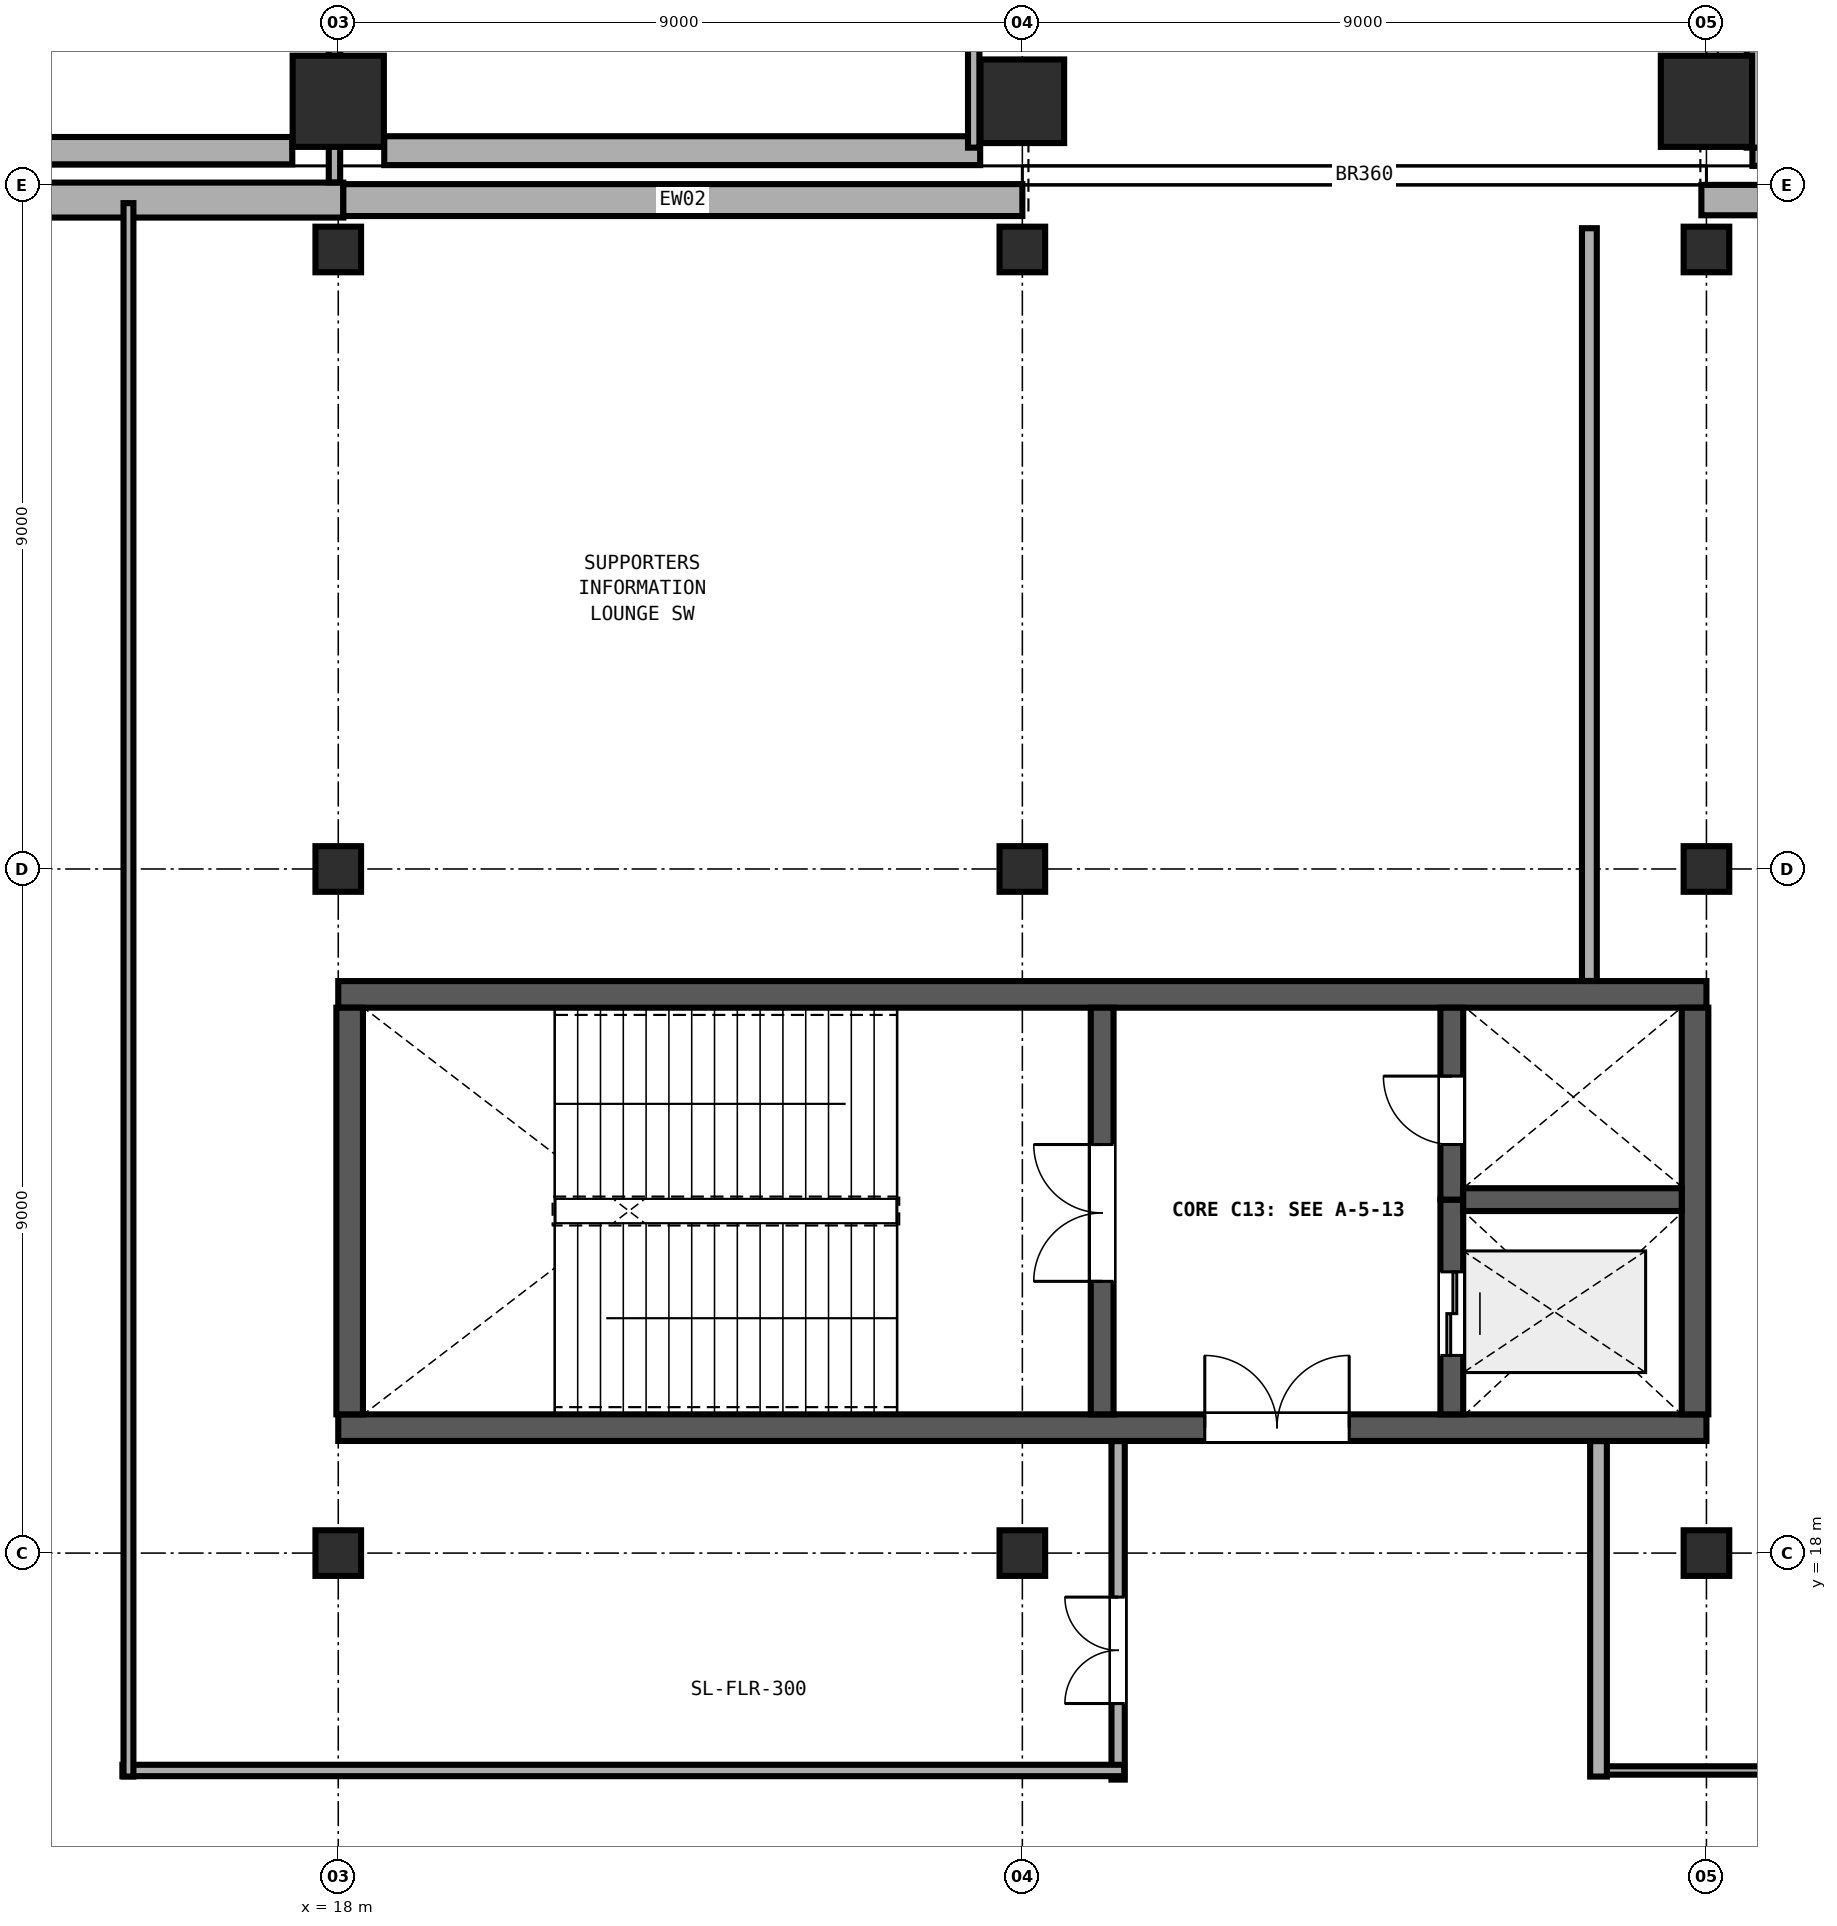
"""IFC4 building model, lengths in metres.
Left out: names, types, materials, properties, quantities, classifications, styles, units other than length and angle.
Written with IfcOpenShell. Run it as: python <this file> out.ifc"""

import sys

from ifc_helpers import new_model, si_unit, direction, frame, frame_2d, origin, origin_2d, place, context, subcontext, project, spatial, rectangle, extrude, element, fill, save


model = new_model("IFC4")
c1 = context("Model", 3, precision=1e-05, world=origin(), true_north=direction((0.0, 1.0)))
c2 = subcontext(c1, "Body", "Model", "MODEL_VIEW")
j1 = project(units=[si_unit("LENGTHUNIT", "METRE"), si_unit("PLANEANGLEUNIT", "RADIAN")], contexts=[c1])
p1 = place(None, origin())
s1 = spatial("IfcSite", under=j1, at=p1, CompositionType="ELEMENT")
p2 = place(p1, origin())
s2 = spatial("IfcBuilding", under=s1, at=p2, CompositionType="ELEMENT")
p3 = place(p2, frame((0.0, 0.0, 4.8)))
s3 = spatial("IfcBuildingStorey", under=s2, at=p3, CompositionType="ELEMENT", Elevation=4.8)
p4 = place(p3, frame((18.0, 37.1, 0.0), z_axis=(0.0, 0.0, 1.0), x_axis=(1.0, 0.0, 0.0)))
e1 = element("IfcColumn", 1, at=p4, inside=s3, PredefinedType="COLUMN", context=c2, shape_type="SweptSolid", body=[
    extrude(rectangle(XDim=1.2, YDim=1.2, at=origin_2d()), origin(), (0.0, 0.0, 1.0), 4.8),
])
p5 = place(p3, frame((27.0, 37.1, 0.0), z_axis=(0.0, 0.0, 1.0), x_axis=(1.0, 0.0, 0.0)))
e2 = element("IfcColumn", 2, at=p5, inside=s3, PredefinedType="COLUMN", context=c2, shape_type="SweptSolid", body=[
    extrude(rectangle(XDim=1.1, YDim=1.1, at=origin_2d()), origin(), (0.0, 0.0, 1.0), 4.8),
])
p6 = place(p3, frame((36.0, 37.1, 0.0), z_axis=(0.0, 0.0, 1.0), x_axis=(1.0, 0.0, 0.0)))
e3 = element("IfcColumn", 3, at=p6, inside=s3, PredefinedType="COLUMN", context=c2, shape_type="SweptSolid", body=[
    extrude(rectangle(XDim=1.2, YDim=1.2, at=origin_2d()), origin(), (0.0, 0.0, 1.0), 4.8),
])
for number, where, z_axis, x_axis in (
    (4, (18.0, 18.0, 0.0), (0.0, 0.0, 1.0), (1.0, 0.0, 0.0)),
    (5, (18.0, 27.0, 0.0), (0.0, 0.0, 1.0), (1.0, 0.0, 0.0)),
    (6, (18.0, 35.15, 0.0), (0.0, 0.0, 1.0), (1.0, 0.0, 0.0)),
    (7, (27.0, 18.0, 0.0), (0.0, 0.0, 1.0), (1.0, 0.0, 0.0)),
    (8, (27.0, 27.0, 0.0), (0.0, 0.0, 1.0), (1.0, 0.0, 0.0)),
    (9, (27.0, 35.15, 0.0), (0.0, 0.0, 1.0), (1.0, 0.0, 0.0)),
    (10, (36.0, 18.0, 0.0), (0.0, 0.0, 1.0), (1.0, 0.0, 0.0)),
    (11, (36.0, 27.0, 0.0), (0.0, 0.0, 1.0), (1.0, 0.0, 0.0)),
    (12, (36.0, 35.15, 0.0), (0.0, 0.0, 1.0), (1.0, 0.0, 0.0)),
):
    element("IfcColumn", number, at=place(p3, frame(where, z_axis=z_axis, x_axis=x_axis)), inside=s3, PredefinedType="COLUMN", context=c2, shape_type="SweptSolid", body=[
        extrude(rectangle(XDim=0.6, YDim=0.6, at=origin_2d()), origin(), (0.0, 0.0, 1.0), 4.8),
    ])
p7 = place(p3, frame((18.0, 19.65, 0.0), z_axis=(0.0, 0.0, 1.0), x_axis=(1.0, 0.0, 0.0)))
e13 = element("IfcWall", 13, at=p7, inside=s3, PredefinedType="SHEAR", context=c2, shape_type="SweptSolid", body=[
    extrude(rectangle(XDim=18.0, YDim=0.35, at=frame_2d((9.0, 0.0))), origin(), (0.0, 0.0, 1.0), 4.565),
])
p8 = place(p7, frame((11.4, 0.0, 0.0)))
e14 = element("IfcOpeningElement", 14, at=p8, cuts=e13, PredefinedType="OPENING", context=c2, shape_type="SweptSolid", body=[
    extrude(rectangle(XDim=1.9, YDim=2.25, at=frame_2d((0.95, 1.125))), frame((0.0, 0.185, 0.0), z_axis=(0.0, -1.0, 0.0), x_axis=(1.0, 0.0, 0.0)), (0.0, 0.0, 1.0), 0.37),
])
p9 = place(p3, frame((36.0, 25.35, 0.0), z_axis=(0.0, 0.0, 1.0), x_axis=(-1.0, 0.0, 0.0)))
e15 = element("IfcWall", 15, at=p9, inside=s3, PredefinedType="SHEAR", context=c2, shape_type="SweptSolid", body=[
    extrude(rectangle(XDim=18.0, YDim=0.35, at=frame_2d((9.0, 0.0))), origin(), (0.0, 0.0, 1.0), 4.565),
])
for number, where, z_axis, x_axis in (
    (16, (18.15, 25.175, 0.0), (0.0, 0.0, 1.0), (0.0, -1.0, 0.0)),
    (17, (35.85, 19.825, 0.0), (0.0, 0.0, 1.0), (0.0, 1.0, 0.0)),
):
    element("IfcWall", number, at=place(p3, frame(where, z_axis=z_axis, x_axis=x_axis)), inside=s3, PredefinedType="SHEAR", context=c2, shape_type="SweptSolid", body=[
        extrude(rectangle(XDim=5.35, YDim=0.35, at=frame_2d((2.675, 0.0))), origin(), (0.0, 0.0, 1.0), 4.565),
    ])
p10 = place(p3, frame((28.05, 19.825, 0.0), z_axis=(0.0, 0.0, 1.0), x_axis=(0.0, 1.0, 0.0)))
e18 = element("IfcWall", 18, at=p10, inside=s3, PredefinedType="SHEAR", context=c2, shape_type="SweptSolid", body=[
    extrude(rectangle(XDim=5.35, YDim=0.3, at=frame_2d((2.675, 0.0))), origin(), (0.0, 0.0, 1.0), 4.565),
])
p11 = place(p10, frame((1.75, 0.0, 0.0)))
e19 = element("IfcOpeningElement", 19, at=p11, cuts=e18, PredefinedType="OPENING", context=c2, shape_type="SweptSolid", body=[
    extrude(rectangle(XDim=1.8, YDim=2.25, at=frame_2d((0.9, 1.125))), frame((0.0, 0.16, 0.0), z_axis=(0.0, -1.0, 0.0), x_axis=(1.0, 0.0, 0.0)), (0.0, 0.0, 1.0), 0.32),
])
p12 = place(p3, frame((32.65, 19.825, 0.0), z_axis=(0.0, 0.0, 1.0), x_axis=(0.0, 1.0, 0.0)))
e20 = element("IfcWall", 20, at=p12, inside=s3, PredefinedType="SHEAR", context=c2, shape_type="SweptSolid", body=[
    extrude(rectangle(XDim=2.825, YDim=0.3, at=frame_2d((1.413, 0.0))), origin(), (0.0, 0.0, 1.0), 4.565),
])
p13 = place(p12, frame((0.775, 0.0, 0.0)))
e21 = element("IfcOpeningElement", 21, at=p13, cuts=e20, PredefinedType="OPENING", context=c2, shape_type="SweptSolid", body=[
    extrude(rectangle(XDim=1.1, YDim=2.1, at=frame_2d((0.55, 1.05))), frame((0.0, 0.16, 0.0), z_axis=(0.0, -1.0, 0.0), x_axis=(1.0, 0.0, 0.0)), (0.0, 0.0, 1.0), 0.32),
])
p14 = place(p3, frame((32.65, 22.65, 0.0), z_axis=(0.0, 0.0, 1.0), x_axis=(0.0, 1.0, 0.0)))
e22 = element("IfcWall", 22, at=p14, inside=s3, PredefinedType="SHEAR", context=c2, shape_type="SweptSolid", body=[
    extrude(rectangle(XDim=2.525, YDim=0.3, at=frame_2d((1.263, 0.0))), origin(), (0.0, 0.0, 1.0), 4.565),
])
p15 = place(p14, frame((0.725, 0.0, 0.0)))
e23 = element("IfcOpeningElement", 23, at=p15, cuts=e22, PredefinedType="OPENING", context=c2, shape_type="SweptSolid", body=[
    extrude(rectangle(XDim=0.9, YDim=2.1, at=frame_2d((0.45, 1.05))), frame((0.0, 0.16, 0.0), z_axis=(0.0, -1.0, 0.0), x_axis=(1.0, 0.0, 0.0)), (0.0, 0.0, 1.0), 0.32),
])
p16 = place(p3, frame((32.8, 22.65, 0.0), z_axis=(0.0, 0.0, 1.0), x_axis=(1.0, 0.0, 0.0)))
e24 = element("IfcWall", 24, at=p16, inside=s3, PredefinedType="SHEAR", context=c2, shape_type="SweptSolid", body=[
    extrude(rectangle(XDim=2.875, YDim=0.3, at=frame_2d((1.438, 0.0))), origin(), (0.0, 0.0, 1.0), 4.565),
])
p17 = place(p3, frame((43.745, 36.45, 0.0), z_axis=(0.0, 0.0, 1.0), x_axis=(-1.0, 0.0, 0.0)))
e25 = element("IfcWall", 25, at=p17, inside=s3, PredefinedType="SOLIDWALL", context=c2, shape_type="SweptSolid", body=[
    extrude(rectangle(XDim=7.14, YDim=0.4, at=frame_2d((3.57, 0.0))), origin(), (0.0, 0.0, 1.0), 3.28),
])
p18 = place(p3, frame((26.445, 36.45, 0.0), z_axis=(0.0, 0.0, 1.0), x_axis=(-1.0, 0.0, 0.0)))
e26 = element("IfcWall", 26, at=p18, inside=s3, PredefinedType="SOLIDWALL", context=c2, shape_type="SweptSolid", body=[
    extrude(rectangle(XDim=7.84, YDim=0.38, at=frame_2d((3.92, 0.0))), origin(), (0.0, 0.0, 1.0), 3.28),
])
p19 = place(p3, frame((17.395, 36.45, 0.0), z_axis=(0.0, 0.0, 1.0), x_axis=(-1.0, 0.0, 0.0)))
e27 = element("IfcWall", 27, at=p19, inside=s3, PredefinedType="SOLIDWALL", context=c2, shape_type="SweptSolid", body=[
    extrude(rectangle(XDim=7.84, YDim=0.36, at=frame_2d((3.92, 0.0))), origin(), (0.0, 0.0, 1.0), 3.28),
])
p20 = place(p3, frame((9.133, 35.8, 0.0), z_axis=(0.0, 0.0, 1.0), x_axis=(1.0, 0.0, 0.0)))
e28 = element("IfcWall", 28, at=p20, inside=s3, PredefinedType="SOLIDWALL", context=c2, shape_type="SweptSolid", body=[
    extrude(rectangle(XDim=8.933, YDim=0.46, at=frame_2d((4.467, 0.0))), origin(), (0.0, 0.0, 1.0), 3.28),
])
p21 = place(p3, frame((18.067, 35.8, 0.0), z_axis=(0.0, 0.0, 1.0), x_axis=(1.0, 0.0, 0.0)))
e29 = element("IfcWall", 29, at=p21, inside=s3, PredefinedType="SOLIDWALL", context=c2, shape_type="SweptSolid", body=[
    extrude(rectangle(XDim=8.933, YDim=0.42, at=frame_2d((4.467, 0.0))), origin(), (0.0, 0.0, 1.0), 3.28),
])
p22 = place(p3, frame((35.933, 35.8, 0.0), z_axis=(0.0, 0.0, 1.0), x_axis=(1.0, 0.0, 0.0)))
e30 = element("IfcWall", 30, at=p22, inside=s3, PredefinedType="SOLIDWALL", context=c2, shape_type="SweptSolid", body=[
    extrude(rectangle(XDim=8.933, YDim=0.4, at=frame_2d((4.467, 0.0))), origin(), (0.0, 0.0, 1.0), 3.28),
])
p23 = place(p3, frame((17.95, 53.173, 0.0), z_axis=(0.0, 0.0, 1.0), x_axis=(0.0, -1.0, 0.0)))
e31 = element("IfcWall", 31, at=p23, inside=s3, PredefinedType="PARTITIONING", context=c2, shape_type="SweptSolid", body=[
    extrude(rectangle(XDim=17.14, YDim=0.15, at=frame_2d((8.57, 0.0))), origin(), (0.0, 0.0, 1.0), 3.28),
])
p24 = place(p3, frame((26.36, 39.5, 0.0), z_axis=(0.0, 0.0, 1.0), x_axis=(0.0, -1.0, 0.0)))
e32 = element("IfcWall", 32, at=p24, inside=s3, PredefinedType="PARTITIONING", context=c2, shape_type="SweptSolid", body=[
    extrude(rectangle(XDim=3.01, YDim=0.15, at=frame_2d((1.505, 0.0))), origin(), (0.0, 0.0, 1.0), 3.28),
])
p25 = place(p3, frame((36.64, 36.49, 0.0), z_axis=(0.0, 0.0, 1.0), x_axis=(0.0, 1.0, 0.0)))
e33 = element("IfcWall", 33, at=p25, inside=s3, PredefinedType="PARTITIONING", context=c2, shape_type="SweptSolid", body=[
    extrude(rectangle(XDim=3.01, YDim=0.22, at=frame_2d((1.505, 0.0))), origin(), (0.0, 0.0, 1.0), 3.28),
])
p26 = place(p3, frame((50.67, 15.14, 0.0), z_axis=(0.0, 0.0, 1.0), x_axis=(-1.0, 0.0, 0.0)))
e34 = element("IfcWall", 34, at=p26, inside=s3, PredefinedType="PARTITIONING", context=c2, shape_type="SweptSolid", body=[
    extrude(rectangle(XDim=16.17, YDim=0.11, at=frame_2d((8.085, 0.0))), origin(), (0.0, 0.0, 1.0), 3.28),
])
p27 = place(p3, frame((34.58, 15.06, 0.0), z_axis=(0.0, 0.0, 1.0), x_axis=(0.0, 1.0, 0.0)))
e35 = element("IfcWall", 35, at=p27, inside=s3, PredefinedType="PARTITIONING", context=c2, shape_type="SweptSolid", body=[
    extrude(rectangle(XDim=4.413, YDim=0.22, at=frame_2d((2.207, 0.0))), origin(), (0.0, 0.0, 1.0), 3.28),
])
p28 = place(p3, frame((34.46, 25.527, 0.0), z_axis=(0.0, 0.0, 1.0), x_axis=(0.0, 1.0, 0.0)))
e36 = element("IfcWall", 36, at=p28, inside=s3, PredefinedType="PARTITIONING", context=c2, shape_type="SweptSolid", body=[
    extrude(rectangle(XDim=9.903, YDim=0.195, at=frame_2d((4.951, 0.0))), origin(), (0.0, 0.0, 1.0), 3.28),
])
p29 = place(p3, frame((28.26, 15.02, 0.0), z_axis=(0.0, 0.0, 1.0), x_axis=(0.0, 1.0, 0.0)))
e37 = element("IfcWall", 37, at=p29, inside=s3, PredefinedType="PARTITIONING", context=c2, shape_type="SweptSolid", body=[
    extrude(rectangle(XDim=4.453, YDim=0.175, at=frame_2d((2.227, 0.0))), origin(), (0.0, 0.0, 1.0), 3.28),
])
p30 = place(p29, frame((1.001, 0.0, 0.0)))
e38 = element("IfcOpeningElement", 38, at=p30, cuts=e37, PredefinedType="OPENING", context=c2, shape_type="SweptSolid", body=[
    extrude(rectangle(XDim=1.4, YDim=2.15, at=frame_2d((0.7, 1.075))), frame((0.0, 0.097, 0.0), z_axis=(0.0, -1.0, 0.0), x_axis=(1.0, 0.0, 0.0)), (0.0, 0.0, 1.0), 0.195),
])
p31 = place(p3, frame((28.34, 15.14, 0.0), z_axis=(0.0, 0.0, 1.0), x_axis=(-1.0, 0.0, 0.0)))
e39 = element("IfcWall", 39, at=p31, inside=s3, PredefinedType="PARTITIONING", context=c2, shape_type="SweptSolid", body=[
    extrude(rectangle(XDim=13.18, YDim=0.15, at=frame_2d((6.59, 0.0))), origin(), (0.0, 0.0, 1.0), 3.28),
])
p32 = place(p3, frame((15.24, 15.06, 0.0), z_axis=(0.0, 0.0, 1.0), x_axis=(0.0, 1.0, 0.0)))
e40 = element("IfcWall", 40, at=p32, inside=s3, PredefinedType="PARTITIONING", context=c2, shape_type="SweptSolid", body=[
    extrude(rectangle(XDim=20.7, YDim=0.13, at=frame_2d((10.35, 0.0))), origin(), (0.0, 0.0, 1.0), 3.28),
])
p33 = place(p11, origin())
e41 = element("IfcDoor", 41, at=p33, inside=s3, OperationType="DOUBLE_DOOR_SINGLE_SWING", PredefinedType="DOOR", context=c2, shape_type="SweptSolid", body=[
    extrude(rectangle(XDim=1.8, YDim=2.25, at=frame_2d((0.9, 1.125))), frame((0.0, 0.025, 0.0), z_axis=(0.0, -1.0, 0.0), x_axis=(1.0, 0.0, 0.0)), (0.0, 0.0, 1.0), 0.05),
])
fill(e19, e41)
p34 = place(p15, origin())
e42 = element("IfcDoor", 42, at=p34, inside=s3, OperationType="SINGLE_SWING_RIGHT", PredefinedType="DOOR", context=c2, shape_type="SweptSolid", body=[
    extrude(rectangle(XDim=0.9, YDim=2.1, at=frame_2d((0.45, 1.05))), frame((0.0, 0.025, 0.0), z_axis=(0.0, -1.0, 0.0), x_axis=(1.0, 0.0, 0.0)), (0.0, 0.0, 1.0), 0.05),
])
fill(e23, e42)
p35 = place(p13, origin())
e43 = element("IfcDoor", 43, at=p35, inside=s3, OperationType="DOUBLE_DOOR_SLIDING", PredefinedType="DOOR", context=c2, shape_type="SweptSolid", body=[
    extrude(rectangle(XDim=1.1, YDim=2.1, at=frame_2d((0.55, 1.05))), frame((0.0, 0.025, 0.0), z_axis=(0.0, -1.0, 0.0), x_axis=(1.0, 0.0, 0.0)), (0.0, 0.0, 1.0), 0.05),
])
fill(e21, e43)
p36 = place(p8, origin())
e44 = element("IfcDoor", 44, at=p36, inside=s3, OperationType="DOUBLE_DOOR_SINGLE_SWING", PredefinedType="DOOR", context=c2, shape_type="SweptSolid", body=[
    extrude(rectangle(XDim=1.9, YDim=2.25, at=frame_2d((0.95, 1.125))), frame((0.0, 0.025, 0.0), z_axis=(0.0, -1.0, 0.0), x_axis=(1.0, 0.0, 0.0)), (0.0, 0.0, 1.0), 0.05),
])
fill(e14, e44)
p37 = place(p30, origin())
e45 = element("IfcDoor", 45, at=p37, inside=s3, OperationType="DOUBLE_DOOR_SINGLE_SWING", PredefinedType="DOOR", context=c2, shape_type="SweptSolid", body=[
    extrude(rectangle(XDim=1.4, YDim=2.15, at=frame_2d((0.7, 1.075))), frame((0.0, 0.025, 0.0), z_axis=(0.0, -1.0, 0.0), x_axis=(1.0, 0.0, 0.0)), (0.0, 0.0, 1.0), 0.05),
])
fill(e38, e45)
save(model, sys.argv[1])
